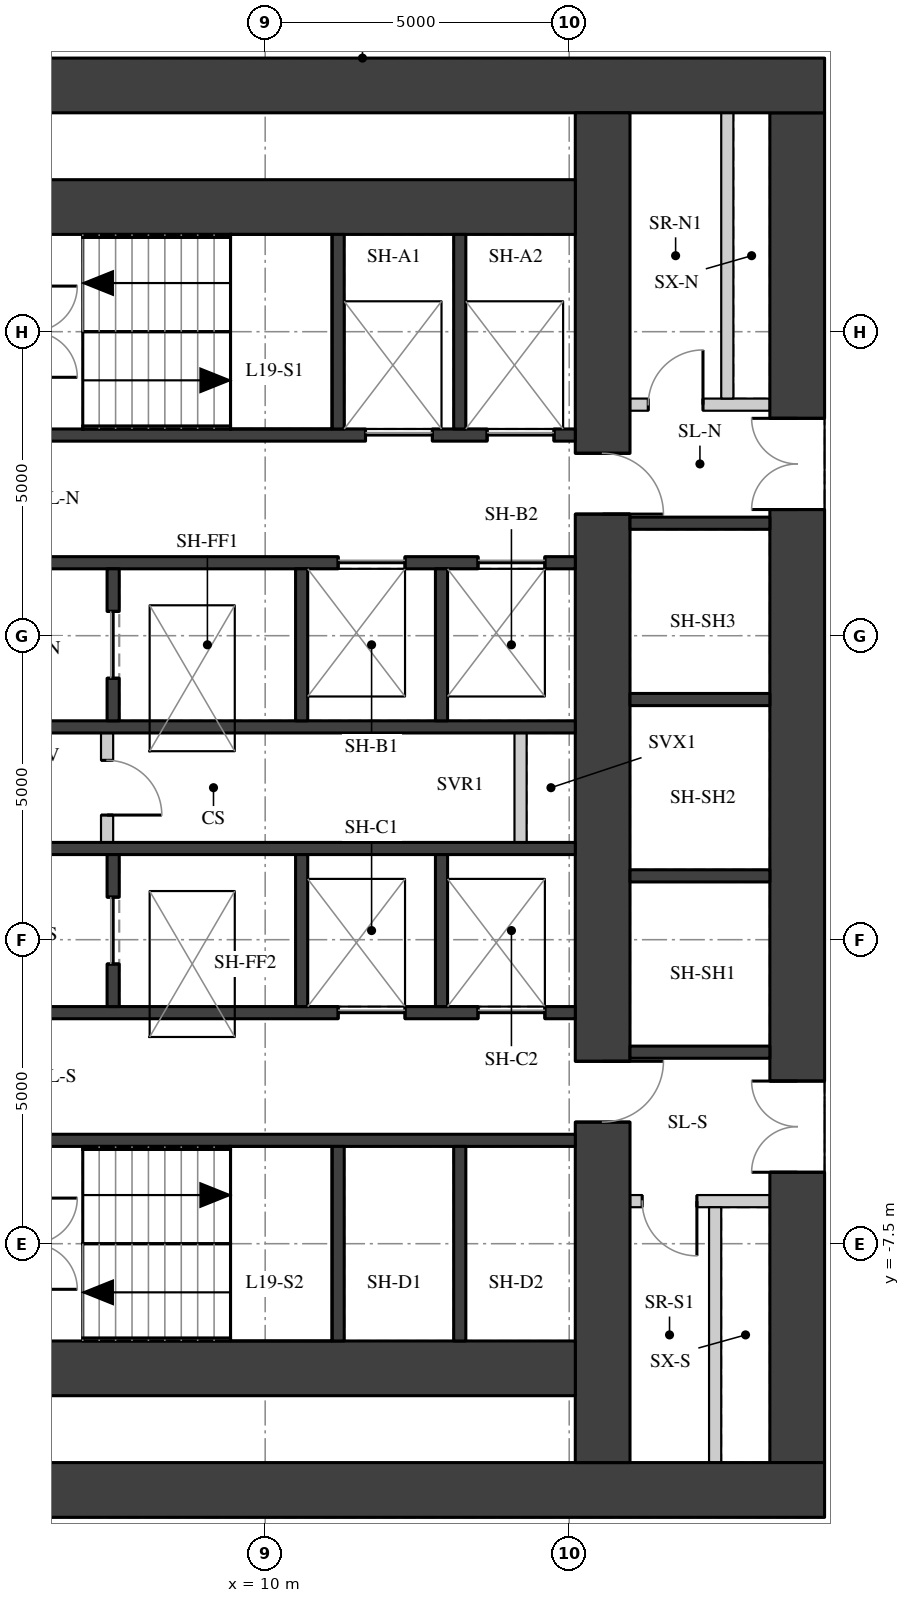
"""IFC4 building model, lengths in metres.
Left out: names, types, materials, properties, quantities, classifications, styles, units other than length and angle.
Written with IfcOpenShell. Run it as: python <this file> out.ifc"""

import sys

from ifc_helpers import new_model, si_unit, direction, frame, frame_2d, origin, place, context, subcontext, project, spatial, rectangle, extrude, element, fill, save


model = new_model("IFC4")
c1 = context("Model", 3, precision=1e-05, world=origin(), true_north=direction((0.0, 1.0)))
c2 = subcontext(c1, "Body", "Model", "MODEL_VIEW")
j1 = project(units=[si_unit("LENGTHUNIT", "METRE"), si_unit("PLANEANGLEUNIT", "RADIAN")], contexts=[c1])
p1 = place(None, origin())
s1 = spatial("IfcSite", under=j1, at=p1, CompositionType="ELEMENT")
p2 = place(p1, origin())
s2 = spatial("IfcBuilding", under=s1, at=p2, CompositionType="ELEMENT")
p3 = place(p2, frame((0.0, 0.0, 71.2)))
s3 = spatial("IfcBuildingStorey", under=s2, at=p3, CompositionType="ELEMENT", Elevation=71.2)
p4 = place(p3, frame((18.75, -11.1, 0.0), z_axis=(0.0, 0.0, 1.0), x_axis=(0.0, 1.0, 0.0)))
e1 = element("IfcWall", 1, at=p4, inside=s3, PredefinedType="SHEAR", context=c2, shape_type="SweptSolid", body=[
    extrude(rectangle(XDim=22.2, YDim=0.9, at=frame_2d((11.1, 0.0))), origin(), (0.0, 0.0, 1.0), 3.02),
])
p5 = place(p4, frame((15.675, 0.0, 0.0)))
e2 = element("IfcOpeningElement", 2, at=p5, cuts=e1, PredefinedType="OPENING", context=c2, shape_type="SweptSolid", body=[
    extrude(rectangle(XDim=1.5, YDim=2.1, at=frame_2d((0.75, 1.05))), frame((0.0, 0.46, 0.0), z_axis=(0.0, -1.0, 0.0), x_axis=(1.0, 0.0, 0.0)), (0.0, 0.0, 1.0), 0.92),
])
p6 = place(p4, frame((4.775, 0.0, 0.0)))
e3 = element("IfcOpeningElement", 3, at=p6, cuts=e1, PredefinedType="OPENING", context=c2, shape_type="SweptSolid", body=[
    extrude(rectangle(XDim=1.5, YDim=2.1, at=frame_2d((0.75, 1.05))), frame((0.0, 0.46, 0.0), z_axis=(0.0, -1.0, 0.0), x_axis=(1.0, 0.0, 0.0)), (0.0, 0.0, 1.0), 0.92),
])
for number, where, z_axis, x_axis in (
    (4, (4.0, 11.55, 0.0), (0.0, 0.0, 1.0), (1.0, 0.0, 0.0)),
    (5, (4.0, -11.55, 0.0), (0.0, 0.0, 1.0), (1.0, 0.0, 0.0)),
):
    element("IfcWall", number, at=place(p3, frame(where, z_axis=z_axis, x_axis=x_axis)), inside=s3, PredefinedType="SHEAR", context=c2, shape_type="SweptSolid", body=[
        extrude(rectangle(XDim=15.2, YDim=0.9, at=frame_2d((7.6, 0.0))), origin(), (0.0, 0.0, 1.0), 3.02),
    ])
p7 = place(p3, frame((15.55, -11.1, 0.0), z_axis=(0.0, 0.0, 1.0), x_axis=(0.0, 1.0, 0.0)))
e6 = element("IfcWall", 6, at=p7, inside=s3, PredefinedType="SHEAR", context=c2, shape_type="SweptSolid", body=[
    extrude(rectangle(XDim=22.2, YDim=0.9, at=frame_2d((11.1, 0.0))), origin(), (0.0, 0.0, 1.0), 3.02),
])
p8 = place(p7, frame((15.6, 0.0, 0.0)))
e7 = element("IfcOpeningElement", 7, at=p8, cuts=e6, PredefinedType="OPENING", context=c2, shape_type="SweptSolid", body=[
    extrude(rectangle(XDim=1.0, YDim=2.1, at=frame_2d((0.5, 1.05))), frame((0.0, 0.46, 0.0), z_axis=(0.0, -1.0, 0.0), x_axis=(1.0, 0.0, 0.0)), (0.0, 0.0, 1.0), 0.92),
])
p9 = place(p7, frame((5.6, 0.0, 0.0)))
e8 = element("IfcOpeningElement", 8, at=p9, cuts=e6, PredefinedType="OPENING", context=c2, shape_type="SweptSolid", body=[
    extrude(rectangle(XDim=1.0, YDim=2.1, at=frame_2d((0.5, 1.05))), frame((0.0, 0.46, 0.0), z_axis=(0.0, -1.0, 0.0), x_axis=(1.0, 0.0, 0.0)), (0.0, 0.0, 1.0), 0.92),
])
for number, where, z_axis, x_axis in (
    (9, (4.9, 9.55, 0.0), (0.0, 0.0, 1.0), (1.0, 0.0, 0.0)),
    (10, (4.9, -9.55, 0.0), (0.0, 0.0, 1.0), (1.0, 0.0, 0.0)),
):
    element("IfcWall", number, at=place(p3, frame(where, z_axis=z_axis, x_axis=x_axis)), inside=s3, PredefinedType="SHEAR", context=c2, shape_type="SweptSolid", body=[
        extrude(rectangle(XDim=10.2, YDim=0.9, at=frame_2d((5.1, 0.0))), origin(), (0.0, 0.0, 1.0), 3.02),
    ])
p10 = place(p3, frame((4.9, 5.8, 0.0), z_axis=(0.0, 0.0, 1.0), x_axis=(1.0, 0.0, 0.0)))
e11 = element("IfcWall", 11, at=p10, inside=s3, PredefinedType="SHEAR", context=c2, shape_type="SweptSolid", body=[
    extrude(rectangle(XDim=10.2, YDim=0.2, at=frame_2d((5.1, 0.0))), origin(), (0.0, 0.0, 1.0), 3.02),
])
p11 = place(p10, frame((6.75, 0.0, 0.0)))
e12 = element("IfcOpeningElement", 12, at=p11, cuts=e11, PredefinedType="OPENING", context=c2, shape_type="SweptSolid", body=[
    extrude(rectangle(XDim=1.1, YDim=2.1, at=frame_2d((0.55, 1.05))), frame((0.0, 0.11, 0.0), z_axis=(0.0, -1.0, 0.0), x_axis=(1.0, 0.0, 0.0)), (0.0, 0.0, 1.0), 0.22),
])
p12 = place(p10, frame((8.75, 0.0, 0.0)))
e13 = element("IfcOpeningElement", 13, at=p12, cuts=e11, PredefinedType="OPENING", context=c2, shape_type="SweptSolid", body=[
    extrude(rectangle(XDim=1.1, YDim=2.1, at=frame_2d((0.55, 1.05))), frame((0.0, 0.11, 0.0), z_axis=(0.0, -1.0, 0.0), x_axis=(1.0, 0.0, 0.0)), (0.0, 0.0, 1.0), 0.22),
])
p13 = place(p3, frame((4.9, 3.7, 0.0), z_axis=(0.0, 0.0, 1.0), x_axis=(1.0, 0.0, 0.0)))
e14 = element("IfcWall", 14, at=p13, inside=s3, PredefinedType="SHEAR", context=c2, shape_type="SweptSolid", body=[
    extrude(rectangle(XDim=10.2, YDim=0.2, at=frame_2d((5.1, 0.0))), origin(), (0.0, 0.0, 1.0), 3.02),
])
p14 = place(p13, frame((6.3, 0.0, 0.0)))
e15 = element("IfcOpeningElement", 15, at=p14, cuts=e14, PredefinedType="OPENING", context=c2, shape_type="SweptSolid", body=[
    extrude(rectangle(XDim=1.1, YDim=2.1, at=frame_2d((0.55, 1.05))), frame((0.0, 0.11, 0.0), z_axis=(0.0, -1.0, 0.0), x_axis=(1.0, 0.0, 0.0)), (0.0, 0.0, 1.0), 0.22),
])
p15 = place(p13, frame((8.6, 0.0, 0.0)))
e16 = element("IfcOpeningElement", 16, at=p15, cuts=e14, PredefinedType="OPENING", context=c2, shape_type="SweptSolid", body=[
    extrude(rectangle(XDim=1.1, YDim=2.1, at=frame_2d((0.55, 1.05))), frame((0.0, 0.11, 0.0), z_axis=(0.0, -1.0, 0.0), x_axis=(1.0, 0.0, 0.0)), (0.0, 0.0, 1.0), 0.22),
])
for number, where, z_axis, x_axis in (
    (17, (4.9, 1.0, 0.0), (0.0, 0.0, 1.0), (1.0, 0.0, 0.0)),
    (18, (4.9, -1.0, 0.0), (0.0, 0.0, 1.0), (1.0, 0.0, 0.0)),
):
    element("IfcWall", number, at=place(p3, frame(where, z_axis=z_axis, x_axis=x_axis)), inside=s3, PredefinedType="SHEAR", context=c2, shape_type="SweptSolid", body=[
        extrude(rectangle(XDim=10.2, YDim=0.2, at=frame_2d((5.1, 0.0))), origin(), (0.0, 0.0, 1.0), 3.02),
    ])
p16 = place(p3, frame((4.9, -3.7, 0.0), z_axis=(0.0, 0.0, 1.0), x_axis=(1.0, 0.0, 0.0)))
e19 = element("IfcWall", 19, at=p16, inside=s3, PredefinedType="SHEAR", context=c2, shape_type="SweptSolid", body=[
    extrude(rectangle(XDim=10.2, YDim=0.2, at=frame_2d((5.1, 0.0))), origin(), (0.0, 0.0, 1.0), 3.02),
])
p17 = place(p16, frame((6.3, 0.0, 0.0)))
e20 = element("IfcOpeningElement", 20, at=p17, cuts=e19, PredefinedType="OPENING", context=c2, shape_type="SweptSolid", body=[
    extrude(rectangle(XDim=1.1, YDim=2.1, at=frame_2d((0.55, 1.05))), frame((0.0, 0.11, 0.0), z_axis=(0.0, -1.0, 0.0), x_axis=(1.0, 0.0, 0.0)), (0.0, 0.0, 1.0), 0.22),
])
p18 = place(p16, frame((8.6, 0.0, 0.0)))
e21 = element("IfcOpeningElement", 21, at=p18, cuts=e19, PredefinedType="OPENING", context=c2, shape_type="SweptSolid", body=[
    extrude(rectangle(XDim=1.1, YDim=2.1, at=frame_2d((0.55, 1.05))), frame((0.0, 0.11, 0.0), z_axis=(0.0, -1.0, 0.0), x_axis=(1.0, 0.0, 0.0)), (0.0, 0.0, 1.0), 0.22),
])
p19 = place(p3, frame((4.9, -5.8, 0.0), z_axis=(0.0, 0.0, 1.0), x_axis=(1.0, 0.0, 0.0)))
e22 = element("IfcWall", 22, at=p19, inside=s3, PredefinedType="SHEAR", context=c2, shape_type="SweptSolid", body=[
    extrude(rectangle(XDim=10.2, YDim=0.2, at=frame_2d((5.1, 0.0))), origin(), (0.0, 0.0, 1.0), 3.02),
])
for number, where, z_axis, x_axis in (
    (23, (11.2, 5.9, 0.0), (0.0, 0.0, 1.0), (0.0, 1.0, 0.0)),
    (24, (11.2, -9.1, 0.0), (0.0, 0.0, 1.0), (0.0, 1.0, 0.0)),
    (25, (13.2, 5.9, 0.0), (0.0, 0.0, 1.0), (0.0, 1.0, 0.0)),
    (26, (13.2, -9.1, 0.0), (0.0, 0.0, 1.0), (0.0, 1.0, 0.0)),
):
    element("IfcWall", number, at=place(p3, frame(where, z_axis=z_axis, x_axis=x_axis)), inside=s3, PredefinedType="SHEAR", context=c2, shape_type="SweptSolid", body=[
        extrude(rectangle(XDim=3.2, YDim=0.2, at=frame_2d((1.6, 0.0))), origin(), (0.0, 0.0, 1.0), 3.02),
    ])
p20 = place(p3, frame((7.5, 1.1, 0.0), z_axis=(0.0, 0.0, 1.0), x_axis=(0.0, 1.0, 0.0)))
e27 = element("IfcWall", 27, at=p20, inside=s3, PredefinedType="SHEAR", context=c2, shape_type="SweptSolid", body=[
    extrude(rectangle(XDim=2.5, YDim=0.2, at=frame_2d((1.25, 0.0))), origin(), (0.0, 0.0, 1.0), 3.02),
])
p21 = place(p20, frame((0.7, 0.0, 0.0)))
e28 = element("IfcOpeningElement", 28, at=p21, cuts=e27, PredefinedType="OPENING", context=c2, shape_type="SweptSolid", body=[
    extrude(rectangle(XDim=1.1, YDim=2.1, at=frame_2d((0.55, 1.05))), frame((0.0, 0.11, 0.0), z_axis=(0.0, -1.0, 0.0), x_axis=(1.0, 0.0, 0.0)), (0.0, 0.0, 1.0), 0.22),
])
p22 = place(p3, frame((7.5, -3.6, 0.0), z_axis=(0.0, 0.0, 1.0), x_axis=(0.0, 1.0, 0.0)))
e29 = element("IfcWall", 29, at=p22, inside=s3, PredefinedType="SHEAR", context=c2, shape_type="SweptSolid", body=[
    extrude(rectangle(XDim=2.5, YDim=0.2, at=frame_2d((1.25, 0.0))), origin(), (0.0, 0.0, 1.0), 3.02),
])
p23 = place(p22, frame((0.7, 0.0, 0.0)))
e30 = element("IfcOpeningElement", 30, at=p23, cuts=e29, PredefinedType="OPENING", context=c2, shape_type="SweptSolid", body=[
    extrude(rectangle(XDim=1.1, YDim=2.1, at=frame_2d((0.55, 1.05))), frame((0.0, 0.11, 0.0), z_axis=(0.0, -1.0, 0.0), x_axis=(1.0, 0.0, 0.0)), (0.0, 0.0, 1.0), 0.22),
])
for number, where, z_axis, x_axis in (
    (31, (10.6, 1.1, 0.0), (0.0, 0.0, 1.0), (0.0, 1.0, 0.0)),
    (32, (10.6, -3.6, 0.0), (0.0, 0.0, 1.0), (0.0, 1.0, 0.0)),
    (33, (12.9, 1.1, 0.0), (0.0, 0.0, 1.0), (0.0, 1.0, 0.0)),
    (34, (12.9, -3.6, 0.0), (0.0, 0.0, 1.0), (0.0, 1.0, 0.0)),
):
    element("IfcWall", number, at=place(p3, frame(where, z_axis=z_axis, x_axis=x_axis)), inside=s3, PredefinedType="SHEAR", context=c2, shape_type="SweptSolid", body=[
        extrude(rectangle(XDim=2.5, YDim=0.2, at=frame_2d((1.25, 0.0))), origin(), (0.0, 0.0, 1.0), 3.02),
    ])
p24 = place(p3, frame((7.4, -0.9, 0.0), z_axis=(0.0, 0.0, 1.0), x_axis=(0.0, 1.0, 0.0)))
e35 = element("IfcWall", 35, at=p24, inside=s3, PredefinedType="PARTITIONING", context=c2, shape_type="SweptSolid", body=[
    extrude(rectangle(XDim=1.8, YDim=0.2, at=frame_2d((0.9, 0.0))), origin(), (0.0, 0.0, 1.0), 3.02),
])
p25 = place(p24, frame((0.45, 0.0, 0.0)))
e36 = element("IfcOpeningElement", 36, at=p25, cuts=e35, PredefinedType="OPENING", context=c2, shape_type="SweptSolid", body=[
    extrude(rectangle(XDim=0.9, YDim=2.1, at=frame_2d((0.45, 1.05))), frame((0.0, 0.11, 0.0), z_axis=(0.0, -1.0, 0.0), x_axis=(1.0, 0.0, 0.0)), (0.0, 0.0, 1.0), 0.22),
])
p26 = place(p3, frame((14.2, -0.9, 0.0), z_axis=(0.0, 0.0, 1.0), x_axis=(0.0, 1.0, 0.0)))
e37 = element("IfcWall", 37, at=p26, inside=s3, PredefinedType="PARTITIONING", context=c2, shape_type="SweptSolid", body=[
    extrude(rectangle(XDim=1.8, YDim=0.2, at=frame_2d((0.9, 0.0))), origin(), (0.0, 0.0, 1.0), 3.02),
])
for number, where, z_axis, x_axis in (
    (38, (16.0, -4.35, 0.0), (0.0, 0.0, 1.0), (1.0, 0.0, 0.0)),
    (39, (16.0, -1.45, 0.0), (0.0, 0.0, 1.0), (1.0, 0.0, 0.0)),
    (40, (16.0, 1.45, 0.0), (0.0, 0.0, 1.0), (1.0, 0.0, 0.0)),
    (41, (16.0, 4.35, 0.0), (0.0, 0.0, 1.0), (1.0, 0.0, 0.0)),
):
    element("IfcWall", number, at=place(p3, frame(where, z_axis=z_axis, x_axis=x_axis)), inside=s3, PredefinedType="SHEAR", context=c2, shape_type="SweptSolid", body=[
        extrude(rectangle(XDim=2.3, YDim=0.2, at=frame_2d((1.15, 0.0))), origin(), (0.0, 0.0, 1.0), 3.02),
    ])
p27 = place(p3, frame((16.0, 6.3, 0.0), z_axis=(0.0, 0.0, 1.0), x_axis=(1.0, 0.0, 0.0)))
e42 = element("IfcWall", 42, at=p27, inside=s3, PredefinedType="PARTITIONING", context=c2, shape_type="SweptSolid", body=[
    extrude(rectangle(XDim=2.3, YDim=0.2, at=frame_2d((1.15, 0.0))), origin(), (0.0, 0.0, 1.0), 3.02),
])
p28 = place(p27, frame((0.3, 0.0, 0.0)))
e43 = element("IfcOpeningElement", 43, at=p28, cuts=e42, PredefinedType="OPENING", context=c2, shape_type="SweptSolid", body=[
    extrude(rectangle(XDim=0.9, YDim=2.1, at=frame_2d((0.45, 1.05))), frame((0.0, 0.11, 0.0), z_axis=(0.0, -1.0, 0.0), x_axis=(1.0, 0.0, 0.0)), (0.0, 0.0, 1.0), 0.22),
])
p29 = place(p3, frame((17.6, 6.4, 0.0), z_axis=(0.0, 0.0, 1.0), x_axis=(0.0, 1.0, 0.0)))
e44 = element("IfcWall", 44, at=p29, inside=s3, PredefinedType="PARTITIONING", context=c2, shape_type="SweptSolid", body=[
    extrude(rectangle(XDim=4.7, YDim=0.2, at=frame_2d((2.35, 0.0))), origin(), (0.0, 0.0, 1.0), 3.02),
])
p30 = place(p3, frame((16.0, -6.8, 0.0), z_axis=(0.0, 0.0, 1.0), x_axis=(1.0, 0.0, 0.0)))
e45 = element("IfcWall", 45, at=p30, inside=s3, PredefinedType="PARTITIONING", context=c2, shape_type="SweptSolid", body=[
    extrude(rectangle(XDim=2.3, YDim=0.2, at=frame_2d((1.15, 0.0))), origin(), (0.0, 0.0, 1.0), 3.02),
])
p31 = place(p30, frame((0.2, 0.0, 0.0)))
e46 = element("IfcOpeningElement", 46, at=p31, cuts=e45, PredefinedType="OPENING", context=c2, shape_type="SweptSolid", body=[
    extrude(rectangle(XDim=0.9, YDim=2.1, at=frame_2d((0.45, 1.05))), frame((0.0, 0.11, 0.0), z_axis=(0.0, -1.0, 0.0), x_axis=(1.0, 0.0, 0.0)), (0.0, 0.0, 1.0), 0.22),
])
p32 = place(p3, frame((17.4, -11.1, 0.0), z_axis=(0.0, 0.0, 1.0), x_axis=(0.0, 1.0, 0.0)))
e47 = element("IfcWall", 47, at=p32, inside=s3, PredefinedType="PARTITIONING", context=c2, shape_type="SweptSolid", body=[
    extrude(rectangle(XDim=4.2, YDim=0.2, at=frame_2d((2.1, 0.0))), origin(), (0.0, 0.0, 1.0), 3.02),
])
p33 = place(p5, origin())
e48 = element("IfcDoor", 48, at=p33, inside=s3, OperationType="DOUBLE_DOOR_SINGLE_SWING", PredefinedType="DOOR", context=c2, shape_type="SweptSolid", body=[
    extrude(rectangle(XDim=1.5, YDim=2.1, at=frame_2d((0.75, 1.05))), frame((0.0, 0.025, 0.0), z_axis=(0.0, -1.0, 0.0), x_axis=(1.0, 0.0, 0.0)), (0.0, 0.0, 1.0), 0.05),
])
fill(e2, e48)
p34 = place(p6, origin())
e49 = element("IfcDoor", 49, at=p34, inside=s3, OperationType="DOUBLE_DOOR_SINGLE_SWING", PredefinedType="DOOR", context=c2, shape_type="SweptSolid", body=[
    extrude(rectangle(XDim=1.5, YDim=2.1, at=frame_2d((0.75, 1.05))), frame((0.0, 0.025, 0.0), z_axis=(0.0, -1.0, 0.0), x_axis=(1.0, 0.0, 0.0)), (0.0, 0.0, 1.0), 0.05),
])
fill(e3, e49)
p35 = place(p11, origin())
e50 = element("IfcDoor", 50, at=p35, inside=s3, OperationType="DOUBLE_DOOR_SLIDING", PredefinedType="DOOR", context=c2, shape_type="SweptSolid", body=[
    extrude(rectangle(XDim=1.1, YDim=2.1, at=frame_2d((0.55, 1.05))), frame((0.0, 0.025, 0.0), z_axis=(0.0, -1.0, 0.0), x_axis=(1.0, 0.0, 0.0)), (0.0, 0.0, 1.0), 0.05),
])
fill(e12, e50)
p36 = place(p12, origin())
e51 = element("IfcDoor", 51, at=p36, inside=s3, OperationType="DOUBLE_DOOR_SLIDING", PredefinedType="DOOR", context=c2, shape_type="SweptSolid", body=[
    extrude(rectangle(XDim=1.1, YDim=2.1, at=frame_2d((0.55, 1.05))), frame((0.0, 0.025, 0.0), z_axis=(0.0, -1.0, 0.0), x_axis=(1.0, 0.0, 0.0)), (0.0, 0.0, 1.0), 0.05),
])
fill(e13, e51)
p37 = place(p14, origin())
e52 = element("IfcDoor", 52, at=p37, inside=s3, OperationType="DOUBLE_DOOR_SLIDING", PredefinedType="DOOR", context=c2, shape_type="SweptSolid", body=[
    extrude(rectangle(XDim=1.1, YDim=2.1, at=frame_2d((0.55, 1.05))), frame((0.0, 0.025, 0.0), z_axis=(0.0, -1.0, 0.0), x_axis=(1.0, 0.0, 0.0)), (0.0, 0.0, 1.0), 0.05),
])
fill(e15, e52)
p38 = place(p15, origin())
e53 = element("IfcDoor", 53, at=p38, inside=s3, OperationType="DOUBLE_DOOR_SLIDING", PredefinedType="DOOR", context=c2, shape_type="SweptSolid", body=[
    extrude(rectangle(XDim=1.1, YDim=2.1, at=frame_2d((0.55, 1.05))), frame((0.0, 0.025, 0.0), z_axis=(0.0, -1.0, 0.0), x_axis=(1.0, 0.0, 0.0)), (0.0, 0.0, 1.0), 0.05),
])
fill(e16, e53)
p39 = place(p17, origin())
e54 = element("IfcDoor", 54, at=p39, inside=s3, OperationType="DOUBLE_DOOR_SLIDING", PredefinedType="DOOR", context=c2, shape_type="SweptSolid", body=[
    extrude(rectangle(XDim=1.1, YDim=2.1, at=frame_2d((0.55, 1.05))), frame((0.0, 0.025, 0.0), z_axis=(0.0, -1.0, 0.0), x_axis=(1.0, 0.0, 0.0)), (0.0, 0.0, 1.0), 0.05),
])
fill(e20, e54)
p40 = place(p18, origin())
e55 = element("IfcDoor", 55, at=p40, inside=s3, OperationType="DOUBLE_DOOR_SLIDING", PredefinedType="DOOR", context=c2, shape_type="SweptSolid", body=[
    extrude(rectangle(XDim=1.1, YDim=2.1, at=frame_2d((0.55, 1.05))), frame((0.0, 0.025, 0.0), z_axis=(0.0, -1.0, 0.0), x_axis=(1.0, 0.0, 0.0)), (0.0, 0.0, 1.0), 0.05),
])
fill(e21, e55)
p41 = place(p21, origin())
e56 = element("IfcDoor", 56, at=p41, inside=s3, OperationType="DOUBLE_DOOR_SLIDING", PredefinedType="DOOR", context=c2, shape_type="SweptSolid", body=[
    extrude(rectangle(XDim=1.1, YDim=2.1, at=frame_2d((0.55, 1.05))), frame((0.0, 0.025, 0.0), z_axis=(0.0, -1.0, 0.0), x_axis=(1.0, 0.0, 0.0)), (0.0, 0.0, 1.0), 0.05),
])
fill(e28, e56)
p42 = place(p23, origin())
e57 = element("IfcDoor", 57, at=p42, inside=s3, OperationType="DOUBLE_DOOR_SLIDING", PredefinedType="DOOR", context=c2, shape_type="SweptSolid", body=[
    extrude(rectangle(XDim=1.1, YDim=2.1, at=frame_2d((0.55, 1.05))), frame((0.0, 0.025, 0.0), z_axis=(0.0, -1.0, 0.0), x_axis=(1.0, 0.0, 0.0)), (0.0, 0.0, 1.0), 0.05),
])
fill(e30, e57)
p43 = place(p25, origin())
e58 = element("IfcDoor", 58, at=p43, inside=s3, OperationType="SINGLE_SWING_RIGHT", PredefinedType="DOOR", context=c2, shape_type="SweptSolid", body=[
    extrude(rectangle(XDim=0.9, YDim=2.1, at=frame_2d((0.45, 1.05))), frame((0.0, 0.025, 0.0), z_axis=(0.0, -1.0, 0.0), x_axis=(1.0, 0.0, 0.0)), (0.0, 0.0, 1.0), 0.05),
])
fill(e36, e58)
p44 = place(p8, origin())
e59 = element("IfcDoor", 59, at=p44, inside=s3, OperationType="SINGLE_SWING_RIGHT", PredefinedType="DOOR", context=c2, shape_type="SweptSolid", body=[
    extrude(rectangle(XDim=1.0, YDim=2.1, at=frame_2d((0.5, 1.05))), frame((0.0, 0.025, 0.0), z_axis=(0.0, -1.0, 0.0), x_axis=(1.0, 0.0, 0.0)), (0.0, 0.0, 1.0), 0.05),
])
fill(e7, e59)
p45 = place(p28, origin())
e60 = element("IfcDoor", 60, at=p45, inside=s3, OperationType="SINGLE_SWING_RIGHT", PredefinedType="DOOR", context=c2, shape_type="SweptSolid", body=[
    extrude(rectangle(XDim=0.9, YDim=2.1, at=frame_2d((0.45, 1.05))), frame((0.0, 0.025, 0.0), z_axis=(0.0, -1.0, 0.0), x_axis=(1.0, 0.0, 0.0)), (0.0, 0.0, 1.0), 0.05),
])
fill(e43, e60)
p46 = place(p9, origin())
e61 = element("IfcDoor", 61, at=p46, inside=s3, OperationType="SINGLE_SWING_LEFT", PredefinedType="DOOR", context=c2, shape_type="SweptSolid", body=[
    extrude(rectangle(XDim=1.0, YDim=2.1, at=frame_2d((0.5, 1.05))), frame((0.0, 0.025, 0.0), z_axis=(0.0, -1.0, 0.0), x_axis=(1.0, 0.0, 0.0)), (0.0, 0.0, 1.0), 0.05),
])
fill(e8, e61)
p47 = place(p31, origin())
e62 = element("IfcDoor", 62, at=p47, inside=s3, OperationType="SINGLE_SWING_LEFT", PredefinedType="DOOR", context=c2, shape_type="SweptSolid", body=[
    extrude(rectangle(XDim=0.9, YDim=2.1, at=frame_2d((0.45, 1.05))), frame((0.0, 0.025, 0.0), z_axis=(0.0, -1.0, 0.0), x_axis=(1.0, 0.0, 0.0)), (0.0, 0.0, 1.0), 0.05),
])
fill(e46, e62)
save(model, sys.argv[1])
